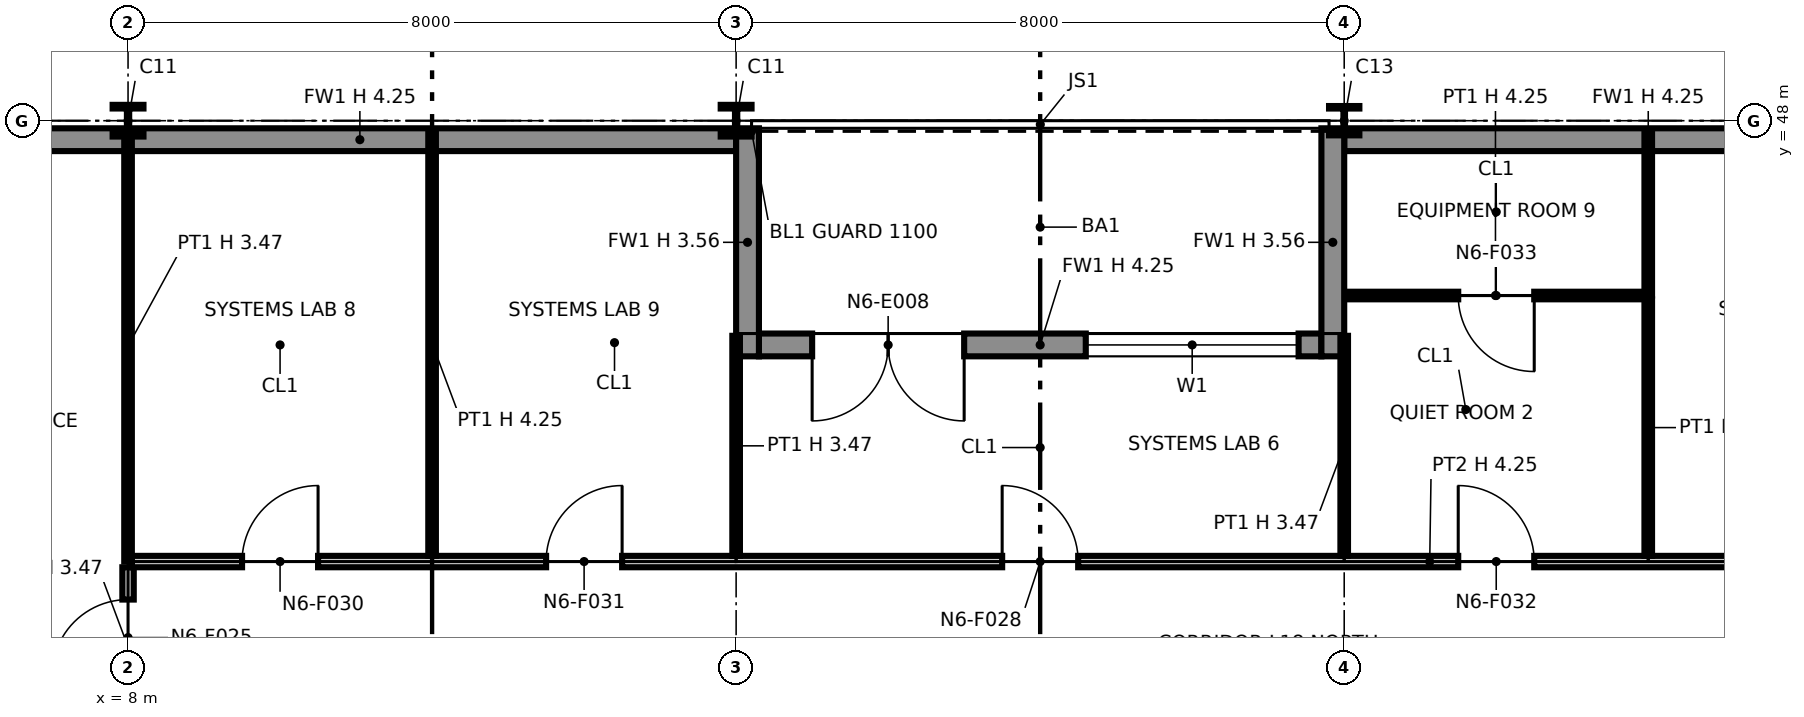
"""IFC4 building model, lengths in metres.
Left out: names, types, materials, properties, quantities, classifications, styles, units other than length and angle.
Written with IfcOpenShell. Run it as: python <this file> out.ifc"""

import sys

from ifc_helpers import new_model, si_unit, direction, frame, frame_2d, origin, origin_2d, place, context, subcontext, project, spatial, polyline, rectangle, i_section, outline, extrude, element, fill, save


model = new_model("IFC4")
c1 = context("Model", 3, precision=1e-05, world=origin(), true_north=direction((0.0, 1.0)))
c2 = subcontext(c1, "Body", "Model", "MODEL_VIEW")
j1 = project(units=[si_unit("LENGTHUNIT", "METRE"), si_unit("PLANEANGLEUNIT", "RADIAN")], contexts=[c1])
p1 = place(None, origin())
s1 = spatial("IfcSite", under=j1, at=p1, CompositionType="ELEMENT")
p2 = place(p1, origin())
s2 = spatial("IfcBuilding", under=s1, at=p2, CompositionType="ELEMENT")
p3 = place(p2, frame((0.0, 0.0, 96.4)))
s3 = spatial("IfcBuildingStorey", under=s2, at=p3, CompositionType="ELEMENT", Elevation=96.4)
for number, where, z_axis, x_axis in (
    (1, (8.0, 48.0, 0.0), (0.0, 0.0, 1.0), (1.0, 0.0, 0.0)),
    (2, (16.0, 48.0, 0.0), (0.0, 0.0, 1.0), (1.0, 0.0, 0.0)),
):
    element("IfcColumn", number, at=place(p3, frame(where, z_axis=z_axis, x_axis=x_axis)), inside=s3, PredefinedType="COLUMN", context=c2, shape_type="SweptSolid", body=[
        extrude(i_section(OverallWidth=0.406, OverallDepth=0.417, WebThickness=0.03, FlangeThickness=0.048, at=origin_2d()), origin(), (0.0, 0.0, 1.0), 4.25),
    ])
p4 = place(p3, frame((24.0, 48.0, 0.0), z_axis=(0.0, 0.0, 1.0), x_axis=(1.0, 0.0, 0.0)))
e3 = element("IfcColumn", 3, at=p4, inside=s3, PredefinedType="COLUMN", context=c2, shape_type="SweptSolid", body=[
    extrude(i_section(OverallWidth=0.399, OverallDepth=0.386, WebThickness=0.021, FlangeThickness=0.033, at=origin_2d()), origin(), (0.0, 0.0, 1.0), 4.25),
])
p5 = place(p3, frame((32.0, 47.75, 0.0), z_axis=(0.0, 0.0, 1.0), x_axis=(-1.0, 0.0, 0.0)))
e4 = element("IfcWall", 4, at=p5, inside=s3, PredefinedType="SOLIDWALL", context=c2, shape_type="SweptSolid", body=[
    extrude(rectangle(XDim=8.0, YDim=0.3, at=frame_2d((4.0, 0.0))), origin(), (0.0, 0.0, 1.0), 4.25),
])
p6 = place(p3, frame((23.7, 45.05, 0.0), z_axis=(0.0, 0.0, 1.0), x_axis=(-1.0, 0.0, 0.0)))
e5 = element("IfcWall", 5, at=p6, inside=s3, PredefinedType="SOLIDWALL", context=c2, shape_type="SweptSolid", body=[
    extrude(rectangle(XDim=7.4, YDim=0.3, at=frame_2d((3.7, 0.0))), origin(), (0.0, 0.0, 1.0), 4.25),
])
p7 = place(p6, frame((0.3, 0.0, 0.9)))
e6 = element("IfcOpeningElement", 6, at=p7, cuts=e5, PredefinedType="OPENING", context=c2, shape_type="SweptSolid", body=[
    extrude(rectangle(XDim=2.8, YDim=2.2, at=frame_2d((1.4, 1.1))), frame((0.0, 0.16, 0.0), z_axis=(0.0, -1.0, 0.0), x_axis=(1.0, 0.0, 0.0)), (0.0, 0.0, 1.0), 0.32),
])
p8 = place(p6, frame((4.7, 0.0, 0.0)))
e7 = element("IfcOpeningElement", 7, at=p8, cuts=e5, PredefinedType="OPENING", context=c2, shape_type="SweptSolid", body=[
    extrude(rectangle(XDim=2.0, YDim=2.4, at=frame_2d((1.0, 1.2))), frame((0.0, 0.16, 0.0), z_axis=(0.0, -1.0, 0.0), x_axis=(1.0, 0.0, 0.0)), (0.0, 0.0, 1.0), 0.32),
])
for number, where, z_axis, x_axis in (
    (8, (23.85, 47.9, 0.0), (0.0, 0.0, 1.0), (0.0, -1.0, 0.0)),
    (9, (16.15, 47.9, 0.0), (0.0, 0.0, 1.0), (0.0, -1.0, 0.0)),
):
    element("IfcWall", number, at=place(p3, frame(where, z_axis=z_axis, x_axis=x_axis)), inside=s3, PredefinedType="SOLIDWALL", context=c2, shape_type="SweptSolid", body=[
        extrude(rectangle(XDim=3.0, YDim=0.3, at=frame_2d((1.5, 0.0))), origin(), (0.0, 0.0, 1.0), 3.556),
    ])
p9 = place(p3, frame((16.0, 47.75, 0.0), z_axis=(0.0, 0.0, 1.0), x_axis=(-1.0, 0.0, 0.0)))
e10 = element("IfcWall", 10, at=p9, inside=s3, PredefinedType="SOLIDWALL", context=c2, shape_type="SweptSolid", body=[
    extrude(rectangle(XDim=9.9, YDim=0.3, at=frame_2d((4.95, 0.0))), origin(), (0.0, 0.0, 1.0), 4.25),
])
p10 = place(p3, frame((8.0, 40.03, 0.0), z_axis=(0.0, 0.0, 1.0), x_axis=(0.0, 1.0, 0.0)))
e11 = element("IfcWall", 11, at=p10, inside=s3, PredefinedType="PARTITIONING", context=c2, shape_type="SweptSolid", body=[
    extrude(rectangle(XDim=2.095, YDim=0.15, at=frame_2d((1.047, 0.0))), origin(), (0.0, 0.0, 1.0), 3.47),
])
p11 = place(p10, frame((0.67, 0.0, 0.0)))
e12 = element("IfcOpeningElement", 12, at=p11, cuts=e11, PredefinedType="OPENING", context=c2, shape_type="SweptSolid", body=[
    extrude(rectangle(XDim=1.0, YDim=2.1, at=frame_2d((0.5, 1.05))), frame((0.0, 0.085, 0.0), z_axis=(0.0, -1.0, 0.0), x_axis=(1.0, 0.0, 0.0)), (0.0, 0.0, 1.0), 0.17),
])
p12 = place(p3, frame((8.05, 42.2, 0.0), z_axis=(0.0, 0.0, 1.0), x_axis=(1.0, 0.0, 0.0)))
e13 = element("IfcWall", 13, at=p12, inside=s3, PredefinedType="PARTITIONING", context=c2, shape_type="SweptSolid", body=[
    extrude(rectangle(XDim=34.15, YDim=0.15, at=frame_2d((17.075, 0.0))), origin(), (0.0, 0.0, 1.0), 4.25),
])
p13 = place(p12, frame((11.45, 0.0, 0.0)))
e14 = element("IfcOpeningElement", 14, at=p13, cuts=e13, PredefinedType="OPENING", context=c2, shape_type="SweptSolid", body=[
    extrude(rectangle(XDim=1.0, YDim=2.1, at=frame_2d((0.5, 1.05))), frame((0.0, 0.085, 0.0), z_axis=(0.0, -1.0, 0.0), x_axis=(1.0, 0.0, 0.0)), (0.0, 0.0, 1.0), 0.17),
])
p14 = place(p12, frame((27.45, 0.0, 0.0)))
e15 = element("IfcOpeningElement", 15, at=p14, cuts=e13, PredefinedType="OPENING", context=c2, shape_type="SweptSolid", body=[
    extrude(rectangle(XDim=1.0, YDim=2.1, at=frame_2d((0.5, 1.05))), frame((0.0, 0.085, 0.0), z_axis=(0.0, -1.0, 0.0), x_axis=(1.0, 0.0, 0.0)), (0.0, 0.0, 1.0), 0.17),
])
p15 = place(p12, frame((1.45, 0.0, 0.0)))
e16 = element("IfcOpeningElement", 16, at=p15, cuts=e13, PredefinedType="OPENING", context=c2, shape_type="SweptSolid", body=[
    extrude(rectangle(XDim=1.0, YDim=2.1, at=frame_2d((0.5, 1.05))), frame((0.0, 0.085, 0.0), z_axis=(0.0, -1.0, 0.0), x_axis=(1.0, 0.0, 0.0)), (0.0, 0.0, 1.0), 0.17),
])
p16 = place(p12, frame((5.45, 0.0, 0.0)))
e17 = element("IfcOpeningElement", 17, at=p16, cuts=e13, PredefinedType="OPENING", context=c2, shape_type="SweptSolid", body=[
    extrude(rectangle(XDim=1.0, YDim=2.1, at=frame_2d((0.5, 1.05))), frame((0.0, 0.085, 0.0), z_axis=(0.0, -1.0, 0.0), x_axis=(1.0, 0.0, 0.0)), (0.0, 0.0, 1.0), 0.17),
])
p17 = place(p12, frame((17.45, 0.0, 0.0)))
e18 = element("IfcOpeningElement", 18, at=p17, cuts=e13, PredefinedType="OPENING", context=c2, shape_type="SweptSolid", body=[
    extrude(rectangle(XDim=1.0, YDim=2.1, at=frame_2d((0.5, 1.05))), frame((0.0, 0.085, 0.0), z_axis=(0.0, -1.0, 0.0), x_axis=(1.0, 0.0, 0.0)), (0.0, 0.0, 1.0), 0.17),
])
p18 = place(p12, frame((21.45, 0.0, 0.0)))
e19 = element("IfcOpeningElement", 19, at=p18, cuts=e13, PredefinedType="OPENING", context=c2, shape_type="SweptSolid", body=[
    extrude(rectangle(XDim=1.0, YDim=2.1, at=frame_2d((0.5, 1.05))), frame((0.0, 0.085, 0.0), z_axis=(0.0, -1.0, 0.0), x_axis=(1.0, 0.0, 0.0)), (0.0, 0.0, 1.0), 0.17),
])
p19 = place(p3, frame((8.0, 42.2, 0.0), z_axis=(0.0, 0.0, 1.0), x_axis=(0.0, 1.0, 0.0)))
e20 = element("IfcWall", 20, at=p19, inside=s3, PredefinedType="PARTITIONING", context=c2, shape_type="SweptSolid", body=[
    extrude(rectangle(XDim=5.67, YDim=0.1, at=frame_2d((2.835, 0.0))), origin(), (0.0, 0.0, 1.0), 3.47),
])
p20 = place(p3, frame((12.0, 42.275, 0.0), z_axis=(0.0, 0.0, 1.0), x_axis=(0.0, 1.0, 0.0)))
e21 = element("IfcWall", 21, at=p20, inside=s3, PredefinedType="PARTITIONING", context=c2, shape_type="SweptSolid", body=[
    extrude(outline(polyline([(0.0, 0.0), (5.595, 0.0), (5.595, 4.25), (2.025, 4.25), (2.023, 3.47), (1.427, 3.47), (1.425, 4.25), (0.0, 4.25), (0.0, 0.0)])), frame((0.0, 0.05, 0.0), z_axis=(0.0, -1.0, 0.0), x_axis=(1.0, 0.0, 0.0)), (0.0, 0.0, 1.0), 0.1),
])
for number, where, z_axis, x_axis in (
    (22, (16.0, 42.275, 0.0), (0.0, 0.0, 1.0), (0.0, 1.0, 0.0)),
    (23, (24.0, 42.275, 0.0), (0.0, 0.0, 1.0), (0.0, 1.0, 0.0)),
):
    element("IfcWall", number, at=place(p3, frame(where, z_axis=z_axis, x_axis=x_axis)), inside=s3, PredefinedType="PARTITIONING", context=c2, shape_type="SweptSolid", body=[
        extrude(rectangle(XDim=2.895, YDim=0.1, at=frame_2d((1.448, 0.0))), origin(), (0.0, 0.0, 1.0), 3.47),
    ])
p21 = place(p3, frame((28.0, 42.275, 0.0), z_axis=(0.0, 0.0, 1.0), x_axis=(0.0, 1.0, 0.0)))
e24 = element("IfcWall", 24, at=p21, inside=s3, PredefinedType="PARTITIONING", context=c2, shape_type="SweptSolid", body=[
    extrude(rectangle(XDim=3.375, YDim=0.1, at=frame_2d((1.688, 0.0))), origin(), (0.0, 0.0, 1.0), 3.47),
])
p22 = place(p3, frame((24.03, 45.7, 0.0), z_axis=(0.0, 0.0, 1.0), x_axis=(1.0, 0.0, 0.0)))
e25 = element("IfcWall", 25, at=p22, inside=s3, PredefinedType="PARTITIONING", context=c2, shape_type="SweptSolid", body=[
    extrude(rectangle(XDim=3.92, YDim=0.1, at=frame_2d((1.96, 0.0))), origin(), (0.0, 0.0, 1.0), 4.25),
])
p23 = place(p22, frame((2.47, 0.0, 0.0), z_axis=(0.0, 0.0, 1.0), x_axis=(-1.0, 0.0, 0.0)))
e26 = element("IfcOpeningElement", 26, at=p23, cuts=e25, PredefinedType="OPENING", context=c2, shape_type="SweptSolid", body=[
    extrude(rectangle(XDim=1.0, YDim=2.1, at=frame_2d((0.5, 1.05))), frame((0.0, 0.06, 0.0), z_axis=(0.0, -1.0, 0.0), x_axis=(1.0, 0.0, 0.0)), (0.0, 0.0, 1.0), 0.12),
])
p24 = place(p3, frame((28.0, 45.7, 0.0), z_axis=(0.0, 0.0, 1.0), x_axis=(0.0, 1.0, 0.0)))
e27 = element("IfcWall", 27, at=p24, inside=s3, PredefinedType="PARTITIONING", context=c2, shape_type="SweptSolid", body=[
    extrude(rectangle(XDim=2.17, YDim=0.1, at=frame_2d((1.085, 0.0))), origin(), (0.0, 0.0, 1.0), 4.25),
])
p25 = place(p7, origin())
e28 = element("IfcWindow", 28, at=p25, inside=s3, PartitioningType="SINGLE_PANEL", PredefinedType="WINDOW", context=c2, shape_type="SweptSolid", body=[
    extrude(rectangle(XDim=2.8, YDim=2.2, at=frame_2d((1.4, 1.1))), frame((0.0, 0.03, 0.0), z_axis=(0.0, -1.0, 0.0), x_axis=(1.0, 0.0, 0.0)), (0.0, 0.0, 1.0), 0.06),
])
fill(e6, e28)
p26 = place(p8, origin())
e29 = element("IfcDoor", 29, at=p26, inside=s3, OperationType="DOUBLE_DOOR_SINGLE_SWING", PredefinedType="DOOR", context=c2, shape_type="SweptSolid", body=[
    extrude(rectangle(XDim=2.0, YDim=2.4, at=frame_2d((1.0, 1.2))), frame((0.0, 0.025, 0.0), z_axis=(0.0, -1.0, 0.0), x_axis=(1.0, 0.0, 0.0)), (0.0, 0.0, 1.0), 0.05),
])
fill(e7, e29)
p27 = place(p11, origin())
e30 = element("IfcDoor", 30, at=p27, inside=s3, OperationType="SINGLE_SWING_LEFT", PredefinedType="DOOR", context=c2, shape_type="SweptSolid", body=[
    extrude(rectangle(XDim=1.0, YDim=2.1, at=frame_2d((0.5, 1.05))), frame((0.0, 0.025, 0.0), z_axis=(0.0, -1.0, 0.0), x_axis=(1.0, 0.0, 0.0)), (0.0, 0.0, 1.0), 0.05),
])
fill(e12, e30)
p28 = place(p13, origin())
e31 = element("IfcDoor", 31, at=p28, inside=s3, OperationType="SINGLE_SWING_LEFT", PredefinedType="DOOR", context=c2, shape_type="SweptSolid", body=[
    extrude(rectangle(XDim=1.0, YDim=2.1, at=frame_2d((0.5, 1.05))), frame((0.0, 0.025, 0.0), z_axis=(0.0, -1.0, 0.0), x_axis=(1.0, 0.0, 0.0)), (0.0, 0.0, 1.0), 0.05),
])
fill(e14, e31)
p29 = place(p15, origin())
e32 = element("IfcDoor", 32, at=p29, inside=s3, OperationType="SINGLE_SWING_RIGHT", PredefinedType="DOOR", context=c2, shape_type="SweptSolid", body=[
    extrude(rectangle(XDim=1.0, YDim=2.1, at=frame_2d((0.5, 1.05))), frame((0.0, 0.025, 0.0), z_axis=(0.0, -1.0, 0.0), x_axis=(1.0, 0.0, 0.0)), (0.0, 0.0, 1.0), 0.05),
])
fill(e16, e32)
p30 = place(p16, origin())
e33 = element("IfcDoor", 33, at=p30, inside=s3, OperationType="SINGLE_SWING_RIGHT", PredefinedType="DOOR", context=c2, shape_type="SweptSolid", body=[
    extrude(rectangle(XDim=1.0, YDim=2.1, at=frame_2d((0.5, 1.05))), frame((0.0, 0.025, 0.0), z_axis=(0.0, -1.0, 0.0), x_axis=(1.0, 0.0, 0.0)), (0.0, 0.0, 1.0), 0.05),
])
fill(e17, e33)
p31 = place(p17, origin())
e34 = element("IfcDoor", 34, at=p31, inside=s3, OperationType="SINGLE_SWING_LEFT", PredefinedType="DOOR", context=c2, shape_type="SweptSolid", body=[
    extrude(rectangle(XDim=1.0, YDim=2.1, at=frame_2d((0.5, 1.05))), frame((0.0, 0.025, 0.0), z_axis=(0.0, -1.0, 0.0), x_axis=(1.0, 0.0, 0.0)), (0.0, 0.0, 1.0), 0.05),
])
fill(e18, e34)
p32 = place(p23, origin())
e35 = element("IfcDoor", 35, at=p32, inside=s3, OperationType="SINGLE_SWING_LEFT", PredefinedType="DOOR", context=c2, shape_type="SweptSolid", body=[
    extrude(rectangle(XDim=1.0, YDim=2.1, at=frame_2d((0.5, 1.05))), frame((0.0, 0.025, 0.0), z_axis=(0.0, -1.0, 0.0), x_axis=(1.0, 0.0, 0.0)), (0.0, 0.0, 1.0), 0.05),
])
fill(e26, e35)
save(model, sys.argv[1])
